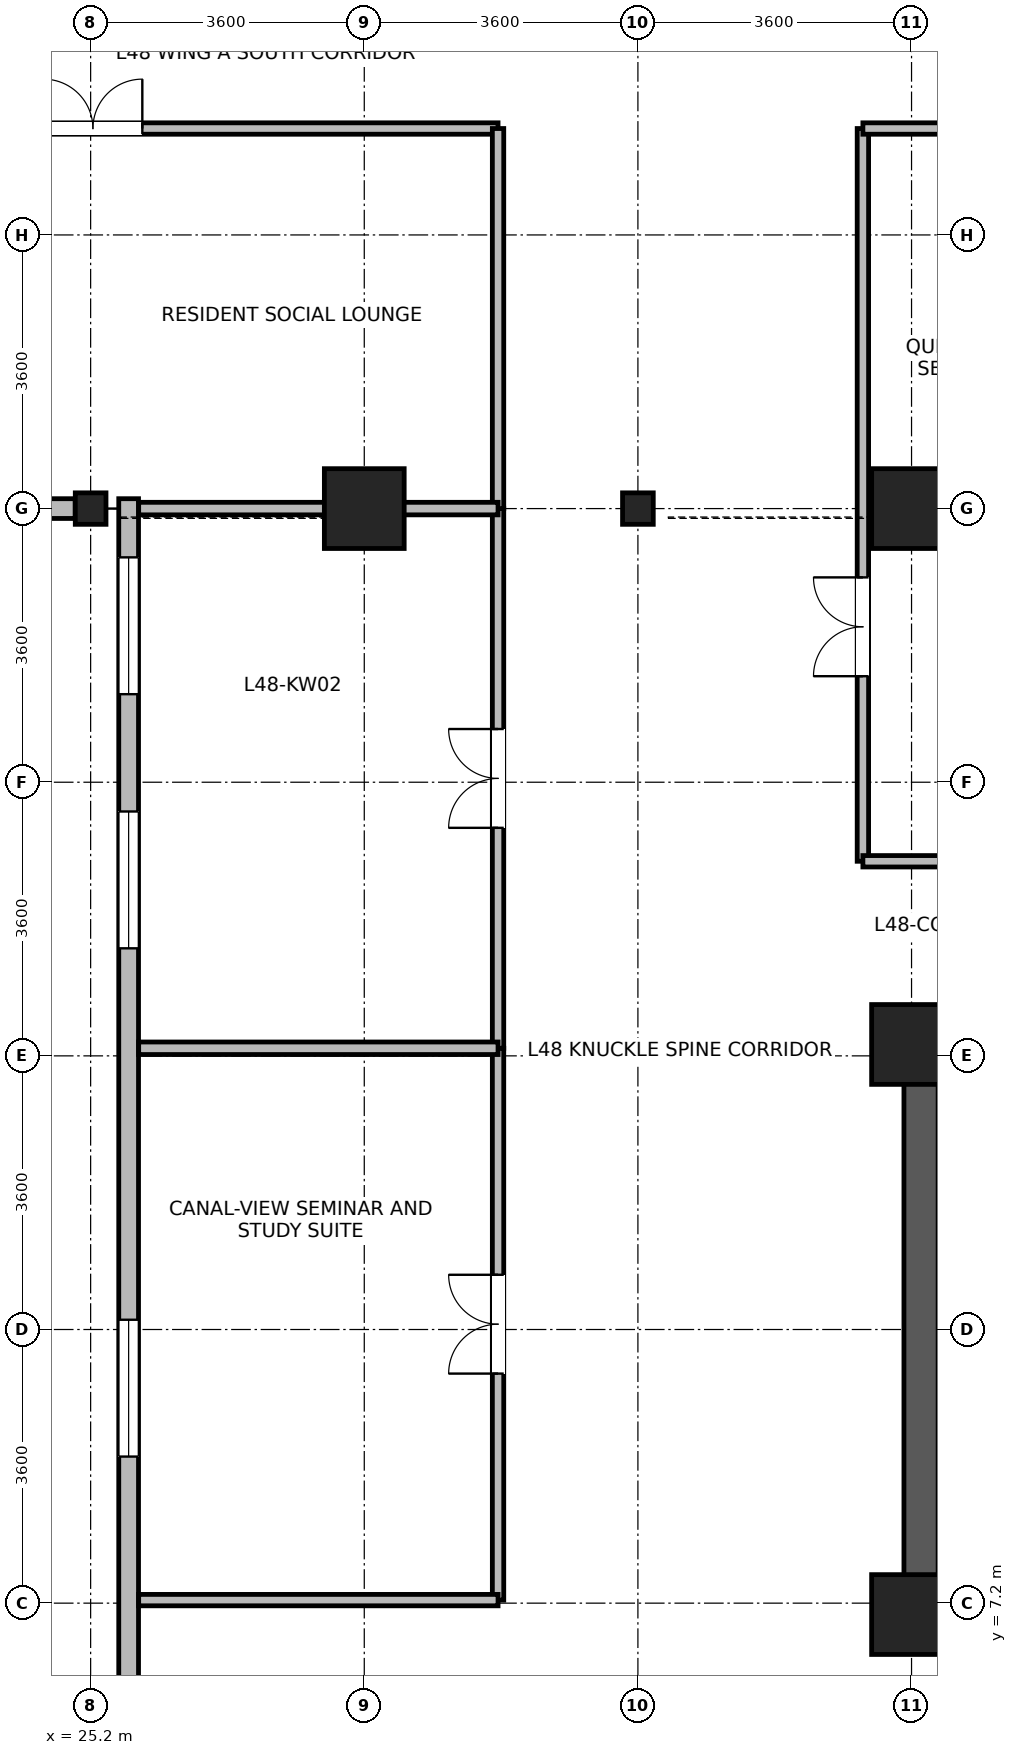
"""IFC4 building model, lengths in metres.
Left out: names, types, materials, properties, quantities, classifications, styles, units other than length and angle.
Written with IfcOpenShell. Run it as: python <this file> out.ifc"""

import sys

from ifc_helpers import new_model, si_unit, direction, frame, frame_2d, origin, origin_2d, place, context, subcontext, project, spatial, rectangle, i_section, extrude, source, transform, mapped, element, fill, save


model = new_model("IFC4")
c1 = context("Model", 3, precision=1e-05, world=origin(), true_north=direction((0.0, 1.0)))
c2 = subcontext(c1, "Body", "Model", "MODEL_VIEW")
j1 = project(units=[si_unit("LENGTHUNIT", "METRE"), si_unit("PLANEANGLEUNIT", "RADIAN")], contexts=[c1])
p1 = place(None, origin())
s1 = spatial("IfcSite", under=j1, at=p1, CompositionType="ELEMENT")
p2 = place(p1, origin())
s2 = spatial("IfcBuilding", under=s1, at=p2, CompositionType="ELEMENT")
p3 = place(p2, frame((0.0, 0.0, 188.3)))
s3 = spatial("IfcBuildingStorey", under=s2, at=p3, CompositionType="ELEMENT", Elevation=188.3)
p4 = place(p3, frame((36.125, 6.85, 0.0), z_axis=(0.0, 0.0, 1.0), x_axis=(0.0, 1.0, 0.0)))
e1 = element("IfcWall", 1, at=p4, inside=s3, PredefinedType="SHEAR", context=c2, shape_type="SweptSolid", body=[
    extrude(rectangle(XDim=7.9, YDim=0.45, at=frame_2d((3.95, 0.0))), origin(), (0.0, 0.0, 1.0), 3.34),
])
m1 = source(origin(), c2, "Body", "SweptSolid", [
    extrude(rectangle(XDim=1.05, YDim=1.05, at=origin_2d()), origin(), (0.0, 0.0, 1.0), 3.7),
])
for number, where, z_axis, x_axis in (
    (2, (28.8, 21.6, 0.0), (0.0, 0.0, 1.0), (1.0, 0.0, 0.0)),
    (3, (36.0, 21.6, 0.0), (0.0, 0.0, 1.0), (1.0, 0.0, 0.0)),
    (4, (36.0, 7.05, 0.0), (0.0, 0.0, 1.0), (1.0, 0.0, 0.0)),
    (5, (36.0, 14.55, 0.0), (0.0, 0.0, 1.0), (1.0, 0.0, 0.0)),
):
    element("IfcColumn", number, at=place(p3, frame(where, z_axis=z_axis, x_axis=x_axis)), inside=s3, PredefinedType="COLUMN", context=c2, shape_type="MappedRepresentation", body=[
        mapped(m1, transform((0.0, 0.0, 0.0), x_axis=(1.0, 0.0, 0.0), y_axis=(0.0, 1.0, 0.0), z_axis=(0.0, 0.0, 1.0), scale=1.0)),
    ])
m2 = source(origin(), c2, "Body", "SweptSolid", [
    extrude(i_section(OverallWidth=0.404, OverallDepth=0.414, WebThickness=0.021, FlangeThickness=0.028, FilletRadius=0.015, at=origin_2d()), origin(), (0.0, 0.0, 1.0), 3.7),
])
for number, where, z_axis, x_axis in (
    (6, (25.2, 21.6, 0.0), (0.0, 0.0, 1.0), (1.0, 0.0, 0.0)),
    (7, (32.4, 21.6, 0.0), (0.0, 0.0, 1.0), (1.0, 0.0, 0.0)),
):
    element("IfcColumn", number, at=place(p3, frame(where, z_axis=z_axis, x_axis=x_axis)), inside=s3, PredefinedType="COLUMN", context=c2, shape_type="MappedRepresentation", body=[
        mapped(m2, transform((0.0, 0.0, 0.0), x_axis=(1.0, 0.0, 0.0), y_axis=(0.0, 1.0, 0.0), z_axis=(0.0, 0.0, 1.0), scale=1.0)),
    ])
p5 = place(p3, frame((24.997, 21.6, 0.0), z_axis=(0.0, 0.0, 1.0), x_axis=(-1.0, 0.0, 0.0)))
e8 = element("IfcWall", 8, at=p5, inside=s3, PredefinedType="STANDARD", context=c2, shape_type="SweptSolid", body=[
    extrude(rectangle(XDim=2.871, YDim=0.26, at=frame_2d((1.436, 0.0))), origin(), (0.0, 0.0, 1.0), 2.87),
])
p6 = place(p5, frame((0.96, 0.0, 0.85)))
e9 = element("IfcOpeningElement", 9, at=p6, cuts=e8, PredefinedType="OPENING", context=c2, shape_type="SweptSolid", body=[
    extrude(rectangle(XDim=0.95, YDim=1.75, at=frame_2d((0.475, 0.875))), frame((0.0, 0.14, 0.0), z_axis=(0.0, -1.0, 0.0), x_axis=(1.0, 0.0, 0.0)), (0.0, 0.0, 1.0), 0.28),
])
p7 = place(p3, frame((25.7, 1.67, 0.0), z_axis=(0.0, 0.0, 1.0), x_axis=(0.0, 1.0, 0.0)))
e10 = element("IfcWall", 10, at=p7, inside=s3, PredefinedType="STANDARD", context=c2, shape_type="SweptSolid", body=[
    extrude(rectangle(XDim=20.06, YDim=0.26, at=frame_2d((10.03, 0.0))), origin(), (0.0, 0.0, 1.0), 3.32),
])
p8 = place(p7, frame((0.772, 0.0, 0.85)))
e11 = element("IfcOpeningElement", 11, at=p8, cuts=e10, PredefinedType="OPENING", context=c2, shape_type="SweptSolid", body=[
    extrude(rectangle(XDim=1.8, YDim=1.85, at=frame_2d((0.9, 0.925))), frame((0.0, 0.14, 0.0), z_axis=(0.0, -1.0, 0.0), x_axis=(1.0, 0.0, 0.0)), (0.0, 0.0, 1.0), 0.28),
])
p9 = place(p7, frame((7.458, 0.0, 0.85)))
e12 = element("IfcOpeningElement", 12, at=p9, cuts=e10, PredefinedType="OPENING", context=c2, shape_type="SweptSolid", body=[
    extrude(rectangle(XDim=1.8, YDim=1.85, at=frame_2d((0.9, 0.925))), frame((0.0, 0.14, 0.0), z_axis=(0.0, -1.0, 0.0), x_axis=(1.0, 0.0, 0.0)), (0.0, 0.0, 1.0), 0.28),
])
p10 = place(p7, frame((14.145, 0.0, 0.85)))
e13 = element("IfcOpeningElement", 13, at=p10, cuts=e10, PredefinedType="OPENING", context=c2, shape_type="SweptSolid", body=[
    extrude(rectangle(XDim=1.8, YDim=1.85, at=frame_2d((0.9, 0.925))), frame((0.0, 0.14, 0.0), z_axis=(0.0, -1.0, 0.0), x_axis=(1.0, 0.0, 0.0)), (0.0, 0.0, 1.0), 0.28),
])
p11 = place(p7, frame((17.488, 0.0, 0.85)))
e14 = element("IfcOpeningElement", 14, at=p11, cuts=e10, PredefinedType="OPENING", context=c2, shape_type="SweptSolid", body=[
    extrude(rectangle(XDim=1.8, YDim=1.85, at=frame_2d((0.9, 0.925))), frame((0.0, 0.14, 0.0), z_axis=(0.0, -1.0, 0.0), x_axis=(1.0, 0.0, 0.0)), (0.0, 0.0, 1.0), 0.28),
])
p12 = place(p3, frame((19.9, 26.6, 0.0), z_axis=(0.0, 0.0, 1.0), x_axis=(1.0, 0.0, 0.0)))
e15 = element("IfcWall", 15, at=p12, inside=s3, PredefinedType="PARTITIONING", context=c2, shape_type="SweptSolid", body=[
    extrude(rectangle(XDim=10.66, YDim=0.15, at=frame_2d((5.33, 0.0))), origin(), (0.0, 0.0, 1.0), 3.32),
])
p13 = place(p12, frame((4.68, 0.0, 0.0)))
e16 = element("IfcOpeningElement", 16, at=p13, cuts=e15, PredefinedType="OPENING", context=c2, shape_type="SweptSolid", body=[
    extrude(rectangle(XDim=1.3, YDim=2.12, at=frame_2d((0.65, 1.06))), frame((0.0, 0.085, 0.0), z_axis=(0.0, -1.0, 0.0), x_axis=(1.0, 0.0, 0.0)), (0.0, 0.0, 1.0), 0.17),
])
p14 = place(p3, frame((35.36, 16.96, 0.0), z_axis=(0.0, 0.0, 1.0), x_axis=(0.0, 1.0, 0.0)))
e17 = element("IfcWall", 17, at=p14, inside=s3, PredefinedType="PARTITIONING", context=c2, shape_type="SweptSolid", body=[
    extrude(rectangle(XDim=9.64, YDim=0.15, at=frame_2d((4.82, 0.0))), origin(), (0.0, 0.0, 1.0), 3.32),
])
p15 = place(p14, frame((2.435, 0.0, 0.0)))
e18 = element("IfcOpeningElement", 18, at=p15, cuts=e17, PredefinedType="OPENING", context=c2, shape_type="SweptSolid", body=[
    extrude(rectangle(XDim=1.3, YDim=2.12, at=frame_2d((0.65, 1.06))), frame((0.0, 0.085, 0.0), z_axis=(0.0, -1.0, 0.0), x_axis=(1.0, 0.0, 0.0)), (0.0, 0.0, 1.0), 0.17),
])
p16 = place(p3, frame((30.56, 7.24, 0.0), z_axis=(0.0, 0.0, 1.0), x_axis=(0.0, 1.0, 0.0)))
e19 = element("IfcWall", 19, at=p16, inside=s3, PredefinedType="PARTITIONING", context=c2, shape_type="SweptSolid", body=[
    extrude(rectangle(XDim=7.26, YDim=0.15, at=frame_2d((3.63, 0.0))), origin(), (0.0, 0.0, 1.0), 3.32),
])
p17 = place(p16, frame((2.98, 0.0, 0.0)))
e20 = element("IfcOpeningElement", 20, at=p17, cuts=e19, PredefinedType="OPENING", context=c2, shape_type="SweptSolid", body=[
    extrude(rectangle(XDim=1.3, YDim=2.12, at=frame_2d((0.65, 1.06))), frame((0.0, 0.085, 0.0), z_axis=(0.0, -1.0, 0.0), x_axis=(1.0, 0.0, 0.0)), (0.0, 0.0, 1.0), 0.17),
])
p18 = place(p3, frame((30.56, 14.5, 0.0), z_axis=(0.0, 0.0, 1.0), x_axis=(0.0, 1.0, 0.0)))
e21 = element("IfcWall", 21, at=p18, inside=s3, PredefinedType="PARTITIONING", context=c2, shape_type="SweptSolid", body=[
    extrude(rectangle(XDim=7.1, YDim=0.15, at=frame_2d((3.55, 0.0))), origin(), (0.0, 0.0, 1.0), 3.32),
])
p19 = place(p18, frame((2.9, 0.0, 0.0)))
e22 = element("IfcOpeningElement", 22, at=p19, cuts=e21, PredefinedType="OPENING", context=c2, shape_type="SweptSolid", body=[
    extrude(rectangle(XDim=1.3, YDim=2.12, at=frame_2d((0.65, 1.06))), frame((0.0, 0.085, 0.0), z_axis=(0.0, -1.0, 0.0), x_axis=(1.0, 0.0, 0.0)), (0.0, 0.0, 1.0), 0.17),
])
p20 = place(p3, frame((30.56, 21.6, 0.0), z_axis=(0.0, 0.0, 1.0), x_axis=(0.0, 1.0, 0.0)))
e23 = element("IfcWall", 23, at=p20, inside=s3, PredefinedType="PARTITIONING", context=c2, shape_type="SweptSolid", body=[
    extrude(rectangle(XDim=5.0, YDim=0.15, at=frame_2d((2.5, 0.0))), origin(), (0.0, 0.0, 1.0), 3.32),
])
p21 = place(p3, frame((25.832, 7.24, 0.0), z_axis=(0.0, 0.0, 1.0), x_axis=(1.0, 0.0, 0.0)))
e24 = element("IfcWall", 24, at=p21, inside=s3, PredefinedType="PARTITIONING", context=c2, shape_type="SweptSolid", body=[
    extrude(rectangle(XDim=4.728, YDim=0.15, at=frame_2d((2.364, 0.0))), origin(), (0.0, 0.0, 1.0), 3.32),
])
for number, where, z_axis, x_axis in (
    (25, (35.36, 16.96, 0.0), (0.0, 0.0, 1.0), (1.0, 0.0, 0.0)),
    (26, (35.36, 26.6, 0.0), (0.0, 0.0, 1.0), (1.0, 0.0, 0.0)),
):
    element("IfcWall", number, at=place(p3, frame(where, z_axis=z_axis, x_axis=x_axis)), inside=s3, PredefinedType="PARTITIONING", context=c2, shape_type="SweptSolid", body=[
        extrude(rectangle(XDim=3.48, YDim=0.15, at=frame_2d((1.74, 0.0))), origin(), (0.0, 0.0, 1.0), 3.32),
    ])
p22 = place(p3, frame((25.832, 14.5, 0.0), z_axis=(0.0, 0.0, 1.0), x_axis=(1.0, 0.0, 0.0)))
e27 = element("IfcWall", 27, at=p22, inside=s3, PredefinedType="PARTITIONING", context=c2, shape_type="SweptSolid", body=[
    extrude(rectangle(XDim=4.728, YDim=0.165, at=frame_2d((2.364, 0.0))), origin(), (0.0, 0.0, 1.0), 3.32),
])
p23 = place(p3, frame((25.832, 21.6, 0.0), z_axis=(0.0, 0.0, 1.0), x_axis=(1.0, 0.0, 0.0)))
e28 = element("IfcWall", 28, at=p23, inside=s3, PredefinedType="PARTITIONING", context=c2, shape_type="SweptSolid", body=[
    extrude(rectangle(XDim=4.728, YDim=0.165, at=frame_2d((2.364, 0.0))), origin(), (0.0, 0.0, 1.0), 2.87),
])
p24 = place(p9, origin())
e29 = element("IfcWindow", 29, at=p24, inside=s3, PartitioningType="SINGLE_PANEL", PredefinedType="WINDOW", context=c2, shape_type="SweptSolid", body=[
    extrude(rectangle(XDim=1.8, YDim=1.85, at=frame_2d((0.9, 0.925))), frame((0.0, 0.03, 0.0), z_axis=(0.0, -1.0, 0.0), x_axis=(1.0, 0.0, 0.0)), (0.0, 0.0, 1.0), 0.06),
])
fill(e12, e29)
p25 = place(p10, origin())
e30 = element("IfcWindow", 30, at=p25, inside=s3, PartitioningType="SINGLE_PANEL", PredefinedType="WINDOW", context=c2, shape_type="SweptSolid", body=[
    extrude(rectangle(XDim=1.8, YDim=1.85, at=frame_2d((0.9, 0.925))), frame((0.0, 0.03, 0.0), z_axis=(0.0, -1.0, 0.0), x_axis=(1.0, 0.0, 0.0)), (0.0, 0.0, 1.0), 0.06),
])
fill(e13, e30)
p26 = place(p11, origin())
e31 = element("IfcWindow", 31, at=p26, inside=s3, PartitioningType="SINGLE_PANEL", PredefinedType="WINDOW", context=c2, shape_type="SweptSolid", body=[
    extrude(rectangle(XDim=1.8, YDim=1.85, at=frame_2d((0.9, 0.925))), frame((0.0, 0.03, 0.0), z_axis=(0.0, -1.0, 0.0), x_axis=(1.0, 0.0, 0.0)), (0.0, 0.0, 1.0), 0.06),
])
fill(e14, e31)
p27 = place(p13, origin())
e32 = element("IfcDoor", 32, at=p27, inside=s3, OperationType="DOUBLE_DOOR_SINGLE_SWING", PredefinedType="DOOR", context=c2, shape_type="SweptSolid", body=[
    extrude(rectangle(XDim=1.3, YDim=2.12, at=frame_2d((0.65, 1.06))), frame((0.0, 0.025, 0.0), z_axis=(0.0, -1.0, 0.0), x_axis=(1.0, 0.0, 0.0)), (0.0, 0.0, 1.0), 0.05),
])
fill(e16, e32)
p28 = place(p15, origin())
e33 = element("IfcDoor", 33, at=p28, inside=s3, OperationType="DOUBLE_DOOR_SINGLE_SWING", PredefinedType="DOOR", context=c2, shape_type="SweptSolid", body=[
    extrude(rectangle(XDim=1.3, YDim=2.12, at=frame_2d((0.65, 1.06))), frame((0.0, 0.025, 0.0), z_axis=(0.0, -1.0, 0.0), x_axis=(1.0, 0.0, 0.0)), (0.0, 0.0, 1.0), 0.05),
])
fill(e18, e33)
p29 = place(p17, origin())
e34 = element("IfcDoor", 34, at=p29, inside=s3, OperationType="DOUBLE_DOOR_SINGLE_SWING", PredefinedType="DOOR", context=c2, shape_type="SweptSolid", body=[
    extrude(rectangle(XDim=1.3, YDim=2.12, at=frame_2d((0.65, 1.06))), frame((0.0, 0.025, 0.0), z_axis=(0.0, -1.0, 0.0), x_axis=(1.0, 0.0, 0.0)), (0.0, 0.0, 1.0), 0.05),
])
fill(e20, e34)
p30 = place(p19, origin())
e35 = element("IfcDoor", 35, at=p30, inside=s3, OperationType="DOUBLE_DOOR_SINGLE_SWING", PredefinedType="DOOR", context=c2, shape_type="SweptSolid", body=[
    extrude(rectangle(XDim=1.3, YDim=2.12, at=frame_2d((0.65, 1.06))), frame((0.0, 0.025, 0.0), z_axis=(0.0, -1.0, 0.0), x_axis=(1.0, 0.0, 0.0)), (0.0, 0.0, 1.0), 0.05),
])
fill(e22, e35)
save(model, sys.argv[1])
